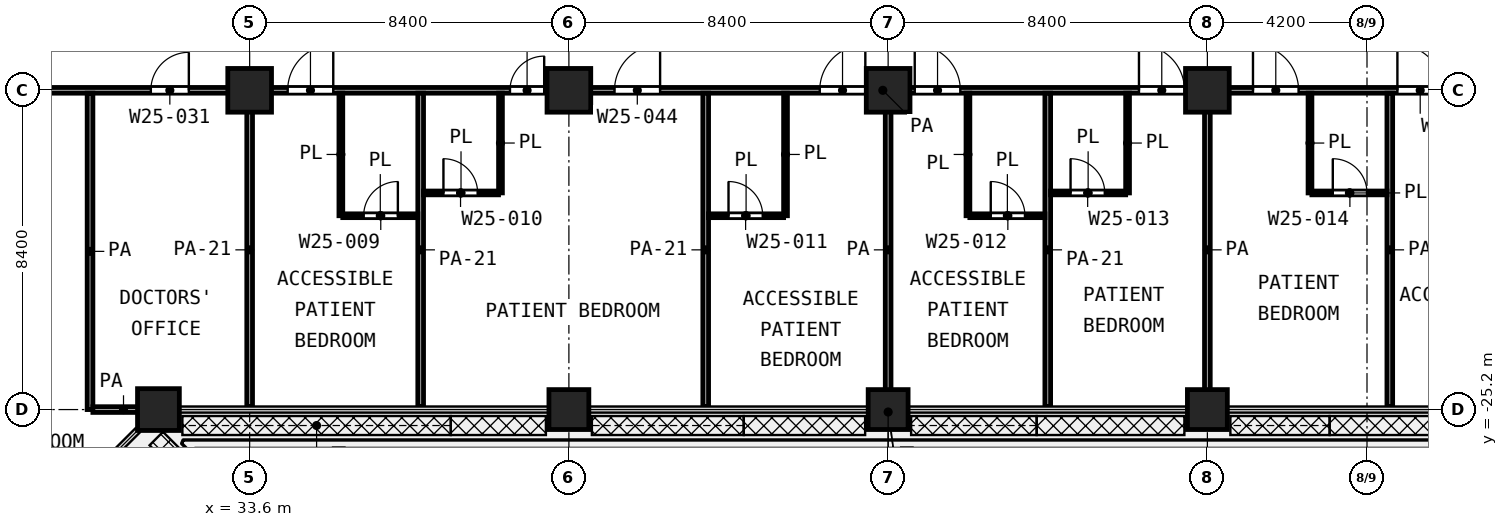
"""IFC4 building model, lengths in metres.
Left out: names, types, materials, properties, quantities, classifications, styles, units other than length and angle.
Written with IfcOpenShell. Run it as: python <this file> out.ifc"""

import sys

from ifc_helpers import new_model, si_unit, direction, frame, frame_2d, origin, origin_2d, place, context, subcontext, project, spatial, rectangle, extrude, element, fill, save


model = new_model("IFC4")
c1 = context("Model", 3, precision=1e-05, world=origin(), true_north=direction((0.0, 1.0)))
c2 = subcontext(c1, "Body", "Model", "MODEL_VIEW")
j1 = project(units=[si_unit("LENGTHUNIT", "METRE"), si_unit("PLANEANGLEUNIT", "RADIAN")], contexts=[c1])
p1 = place(None, origin())
s1 = spatial("IfcSite", under=j1, at=p1, CompositionType="ELEMENT")
p2 = place(p1, origin())
s2 = spatial("IfcBuilding", under=s1, at=p2, CompositionType="ELEMENT")
p3 = place(p2, frame((0.0, 0.0, 132.4)))
s3 = spatial("IfcBuildingStorey", under=s2, at=p3, CompositionType="ELEMENT", Elevation=132.4)
for number, where, z_axis, x_axis in (
    (1, (33.6, -16.8, 0.0), (0.0, 0.0, 1.0), (1.0, 0.0, 0.0)),
    (2, (42.0, -16.8, 0.0), (0.0, 0.0, 1.0), (1.0, 0.0, 0.0)),
    (3, (50.4, -16.8, 0.0), (0.0, 0.0, 1.0), (1.0, 0.0, 0.0)),
    (4, (58.8, -16.8, 0.0), (0.0, 0.0, 1.0), (1.0, 0.0, 0.0)),
):
    element("IfcColumn", number, at=place(p3, frame(where, z_axis=z_axis, x_axis=x_axis)), inside=s3, PredefinedType="COLUMN", context=c2, shape_type="SweptSolid", body=[
        extrude(rectangle(XDim=1.15, YDim=1.15, at=origin_2d()), origin(), (0.0, 0.0, 1.0), 4.2),
    ])
p4 = place(p3, frame((31.2, -25.2, 0.0), z_axis=(0.0, 0.0, 1.0), x_axis=(1.0, 0.0, 0.0)))
e5 = element("IfcColumn", 5, at=p4, inside=s3, PredefinedType="COLUMN", context=c2, shape_type="SweptSolid", body=[
    extrude(rectangle(XDim=1.1, YDim=1.1, at=origin_2d()), origin(), (0.0, 0.0, 1.0), 4.2),
])
for number, where, z_axis, x_axis in (
    (6, (42.0, -25.2, 0.0), (0.0, 0.0, 1.0), (1.0, 0.0, 0.0)),
    (7, (50.4, -25.2, 0.0), (0.0, 0.0, 1.0), (1.0, 0.0, 0.0)),
    (8, (58.8, -25.2, 0.0), (0.0, 0.0, 1.0), (1.0, 0.0, 0.0)),
):
    element("IfcColumn", number, at=place(p3, frame(where, z_axis=z_axis, x_axis=x_axis)), inside=s3, PredefinedType="COLUMN", context=c2, shape_type="SweptSolid", body=[
        extrude(rectangle(XDim=1.05, YDim=1.05, at=origin_2d()), origin(), (0.0, 0.0, 1.0), 4.2),
    ])
p5 = place(p3, frame((36.05, -20.1, 0.0), z_axis=(0.0, 0.0, 1.0), x_axis=(1.0, 0.0, 0.0)))
e9 = element("IfcWall", 9, at=p5, inside=s3, PredefinedType="PARTITIONING", context=c2, shape_type="SweptSolid", body=[
    extrude(rectangle(XDim=1.975, YDim=0.1, at=frame_2d((0.987, 0.0))), origin(), (0.0, 0.0, 1.0), 3.6),
])
p6 = place(p5, frame((0.55, 0.0, 0.0)))
e10 = element("IfcOpeningElement", 10, at=p6, cuts=e9, PredefinedType="OPENING", context=c2, shape_type="SweptSolid", body=[
    extrude(rectangle(XDim=0.9, YDim=2.1, at=frame_2d((0.45, 1.05))), frame((0.0, 0.06, 0.0), z_axis=(0.0, -1.0, 0.0), x_axis=(1.0, 0.0, 0.0)), (0.0, 0.0, 1.0), 0.12),
])
p7 = place(p3, frame((45.675, -20.1, 0.0), z_axis=(0.0, 0.0, 1.0), x_axis=(1.0, 0.0, 0.0)))
e11 = element("IfcWall", 11, at=p7, inside=s3, PredefinedType="PARTITIONING", context=c2, shape_type="SweptSolid", body=[
    extrude(rectangle(XDim=1.975, YDim=0.1, at=frame_2d((0.987, 0.0))), origin(), (0.0, 0.0, 1.0), 3.6),
])
p8 = place(p7, frame((0.525, 0.0, 0.0)))
e12 = element("IfcOpeningElement", 12, at=p8, cuts=e11, PredefinedType="OPENING", context=c2, shape_type="SweptSolid", body=[
    extrude(rectangle(XDim=0.9, YDim=2.1, at=frame_2d((0.45, 1.05))), frame((0.0, 0.06, 0.0), z_axis=(0.0, -1.0, 0.0), x_axis=(1.0, 0.0, 0.0)), (0.0, 0.0, 1.0), 0.12),
])
p9 = place(p3, frame((52.55, -20.1, 0.0), z_axis=(0.0, 0.0, 1.0), x_axis=(1.0, 0.0, 0.0)))
e13 = element("IfcWall", 13, at=p9, inside=s3, PredefinedType="PARTITIONING", context=c2, shape_type="SweptSolid", body=[
    extrude(rectangle(XDim=1.975, YDim=0.1, at=frame_2d((0.987, 0.0))), origin(), (0.0, 0.0, 1.0), 3.6),
])
p10 = place(p9, frame((0.55, 0.0, 0.0)))
e14 = element("IfcOpeningElement", 14, at=p10, cuts=e13, PredefinedType="OPENING", context=c2, shape_type="SweptSolid", body=[
    extrude(rectangle(XDim=0.9, YDim=2.1, at=frame_2d((0.45, 1.05))), frame((0.0, 0.06, 0.0), z_axis=(0.0, -1.0, 0.0), x_axis=(1.0, 0.0, 0.0)), (0.0, 0.0, 1.0), 0.12),
])
p11 = place(p3, frame((38.175, -19.5, 0.0), z_axis=(0.0, 0.0, 1.0), x_axis=(1.0, 0.0, 0.0)))
e15 = element("IfcWall", 15, at=p11, inside=s3, PredefinedType="PARTITIONING", context=c2, shape_type="SweptSolid", body=[
    extrude(rectangle(XDim=1.973, YDim=0.1, at=frame_2d((0.986, 0.0))), origin(), (0.0, 0.0, 1.0), 3.6),
])
p12 = place(p11, frame((0.524, 0.0, 0.0)))
e16 = element("IfcOpeningElement", 16, at=p12, cuts=e15, PredefinedType="OPENING", context=c2, shape_type="SweptSolid", body=[
    extrude(rectangle(XDim=0.9, YDim=2.1, at=frame_2d((0.45, 1.05))), frame((0.0, 0.06, 0.0), z_axis=(0.0, -1.0, 0.0), x_axis=(1.0, 0.0, 0.0)), (0.0, 0.0, 1.0), 0.12),
])
p13 = place(p3, frame((54.675, -19.5, 0.0), z_axis=(0.0, 0.0, 1.0), x_axis=(1.0, 0.0, 0.0)))
e17 = element("IfcWall", 17, at=p13, inside=s3, PredefinedType="PARTITIONING", context=c2, shape_type="SweptSolid", body=[
    extrude(rectangle(XDim=1.975, YDim=0.1, at=frame_2d((0.987, 0.0))), origin(), (0.0, 0.0, 1.0), 3.6),
])
p14 = place(p13, frame((0.525, 0.0, 0.0)))
e18 = element("IfcOpeningElement", 18, at=p14, cuts=e17, PredefinedType="OPENING", context=c2, shape_type="SweptSolid", body=[
    extrude(rectangle(XDim=0.9, YDim=2.1, at=frame_2d((0.45, 1.05))), frame((0.0, 0.06, 0.0), z_axis=(0.0, -1.0, 0.0), x_axis=(1.0, 0.0, 0.0)), (0.0, 0.0, 1.0), 0.12),
])
p15 = place(p3, frame((61.55, -19.5, 0.0), z_axis=(0.0, 0.0, 1.0), x_axis=(1.0, 0.0, 0.0)))
e19 = element("IfcWall", 19, at=p15, inside=s3, PredefinedType="PARTITIONING", context=c2, shape_type="SweptSolid", body=[
    extrude(rectangle(XDim=1.975, YDim=0.1, at=frame_2d((0.987, 0.0))), origin(), (0.0, 0.0, 1.0), 3.6),
])
p16 = place(p15, frame((0.55, 0.0, 0.0)))
e20 = element("IfcOpeningElement", 20, at=p16, cuts=e19, PredefinedType="OPENING", context=c2, shape_type="SweptSolid", body=[
    extrude(rectangle(XDim=0.9, YDim=2.1, at=frame_2d((0.45, 1.05))), frame((0.0, 0.06, 0.0), z_axis=(0.0, -1.0, 0.0), x_axis=(1.0, 0.0, 0.0)), (0.0, 0.0, 1.0), 0.12),
])
p17 = place(p3, frame((36.0, -20.1, 0.0), z_axis=(0.0, 0.0, 1.0), x_axis=(0.0, 1.0, 0.0)))
e21 = element("IfcWall", 21, at=p17, inside=s3, PredefinedType="PARTITIONING", context=c2, shape_type="SweptSolid", body=[
    extrude(rectangle(XDim=3.225, YDim=0.1, at=frame_2d((1.613, 0.0))), origin(), (0.0, 0.0, 1.0), 3.6),
])
p18 = place(p3, frame((40.2, -19.499, 0.0), z_axis=(0.0, 0.0, 1.0), x_axis=(0.0, 1.0, 0.0)))
e22 = element("IfcWall", 22, at=p18, inside=s3, PredefinedType="PARTITIONING", context=c2, shape_type="SweptSolid", body=[
    extrude(rectangle(XDim=2.624, YDim=0.1, at=frame_2d((1.312, 0.0))), origin(), (0.0, 0.0, 1.0), 3.6),
])
for number, where, z_axis, x_axis in (
    (23, (47.7, -20.1, 0.0), (0.0, 0.0, 1.0), (0.0, 1.0, 0.0)),
    (24, (52.5, -20.1, 0.0), (0.0, 0.0, 1.0), (0.0, 1.0, 0.0)),
):
    element("IfcWall", number, at=place(p3, frame(where, z_axis=z_axis, x_axis=x_axis)), inside=s3, PredefinedType="PARTITIONING", context=c2, shape_type="SweptSolid", body=[
        extrude(rectangle(XDim=3.225, YDim=0.1, at=frame_2d((1.613, 0.0))), origin(), (0.0, 0.0, 1.0), 3.6),
    ])
for number, where, z_axis, x_axis in (
    (25, (56.7, -19.5, 0.0), (0.0, 0.0, 1.0), (0.0, 1.0, 0.0)),
    (26, (61.5, -19.5, 0.0), (0.0, 0.0, 1.0), (0.0, 1.0, 0.0)),
):
    element("IfcWall", number, at=place(p3, frame(where, z_axis=z_axis, x_axis=x_axis)), inside=s3, PredefinedType="PARTITIONING", context=c2, shape_type="SweptSolid", body=[
        extrude(rectangle(XDim=2.625, YDim=0.1, at=frame_2d((1.312, 0.0))), origin(), (0.0, 0.0, 1.0), 3.6),
    ])
p19 = place(p3, frame((29.475, -25.2, 0.0), z_axis=(0.0, 0.0, 1.0), x_axis=(1.0, 0.0, 0.0)))
e27 = element("IfcWall", 27, at=p19, inside=s3, PredefinedType="PARTITIONING", context=c2, shape_type="SweptSolid", body=[
    extrude(rectangle(XDim=1.612, YDim=0.15, at=frame_2d((0.806, 0.0))), origin(), (0.0, 0.0, 1.0), 3.6),
])
p20 = place(p3, frame((25.0, -16.8, 0.0), z_axis=(0.0, 0.0, 1.0), x_axis=(1.0, 0.0, 0.0)))
e28 = element("IfcWall", 28, at=p20, inside=s3, PredefinedType="PARTITIONING", context=c2, shape_type="SweptSolid", body=[
    extrude(rectangle(XDim=50.52, YDim=0.15, at=frame_2d((25.26, 0.0))), origin(), (0.0, 0.0, 1.0), 3.6),
])
p21 = place(p20, frame((1.55, 0.0, 0.0)))
e29 = element("IfcOpeningElement", 29, at=p21, cuts=e28, PredefinedType="OPENING", context=c2, shape_type="SweptSolid", body=[
    extrude(rectangle(XDim=1.5, YDim=2.1, at=frame_2d((0.75, 1.05))), frame((0.0, 0.085, 0.0), z_axis=(0.0, -1.0, 0.0), x_axis=(1.0, 0.0, 0.0)), (0.0, 0.0, 1.0), 0.17),
])
p22 = place(p20, frame((6.0, 0.0, 0.0)))
e30 = element("IfcOpeningElement", 30, at=p22, cuts=e28, PredefinedType="OPENING", context=c2, shape_type="SweptSolid", body=[
    extrude(rectangle(XDim=1.0, YDim=2.1, at=frame_2d((0.5, 1.05))), frame((0.0, 0.085, 0.0), z_axis=(0.0, -1.0, 0.0), x_axis=(1.0, 0.0, 0.0)), (0.0, 0.0, 1.0), 0.17),
])
p23 = place(p20, frame((9.6, 0.0, 0.0)))
e31 = element("IfcOpeningElement", 31, at=p23, cuts=e28, PredefinedType="OPENING", context=c2, shape_type="SweptSolid", body=[
    extrude(rectangle(XDim=1.2, YDim=2.1, at=frame_2d((0.6, 1.05))), frame((0.0, 0.085, 0.0), z_axis=(0.0, -1.0, 0.0), x_axis=(1.0, 0.0, 0.0)), (0.0, 0.0, 1.0), 0.17),
])
p24 = place(p20, frame((18.2, 0.0, 0.0)))
e32 = element("IfcOpeningElement", 32, at=p24, cuts=e28, PredefinedType="OPENING", context=c2, shape_type="SweptSolid", body=[
    extrude(rectangle(XDim=1.2, YDim=2.1, at=frame_2d((0.6, 1.05))), frame((0.0, 0.085, 0.0), z_axis=(0.0, -1.0, 0.0), x_axis=(1.0, 0.0, 0.0)), (0.0, 0.0, 1.0), 0.17),
])
p25 = place(p20, frame((15.45, 0.0, 0.0)))
e33 = element("IfcOpeningElement", 33, at=p25, cuts=e28, PredefinedType="OPENING", context=c2, shape_type="SweptSolid", body=[
    extrude(rectangle(XDim=0.9, YDim=2.1, at=frame_2d((0.45, 1.05))), frame((0.0, 0.085, 0.0), z_axis=(0.0, -1.0, 0.0), x_axis=(1.0, 0.0, 0.0)), (0.0, 0.0, 1.0), 0.17),
])
p26 = place(p20, frame((23.6, 0.0, 0.0)))
e34 = element("IfcOpeningElement", 34, at=p26, cuts=e28, PredefinedType="OPENING", context=c2, shape_type="SweptSolid", body=[
    extrude(rectangle(XDim=1.2, YDim=2.1, at=frame_2d((0.6, 1.05))), frame((0.0, 0.085, 0.0), z_axis=(0.0, -1.0, 0.0), x_axis=(1.0, 0.0, 0.0)), (0.0, 0.0, 1.0), 0.17),
])
p27 = place(p20, frame((26.1, 0.0, 0.0)))
e35 = element("IfcOpeningElement", 35, at=p27, cuts=e28, PredefinedType="OPENING", context=c2, shape_type="SweptSolid", body=[
    extrude(rectangle(XDim=1.2, YDim=2.1, at=frame_2d((0.6, 1.05))), frame((0.0, 0.085, 0.0), z_axis=(0.0, -1.0, 0.0), x_axis=(1.0, 0.0, 0.0)), (0.0, 0.0, 1.0), 0.17),
])
p28 = place(p20, frame((32.0, 0.0, 0.0)))
e36 = element("IfcOpeningElement", 36, at=p28, cuts=e28, PredefinedType="OPENING", context=c2, shape_type="SweptSolid", body=[
    extrude(rectangle(XDim=1.2, YDim=2.1, at=frame_2d((0.6, 1.05))), frame((0.0, 0.085, 0.0), z_axis=(0.0, -1.0, 0.0), x_axis=(1.0, 0.0, 0.0)), (0.0, 0.0, 1.0), 0.17),
])
p29 = place(p20, frame((35.0, 0.0, 0.0)))
e37 = element("IfcOpeningElement", 37, at=p29, cuts=e28, PredefinedType="OPENING", context=c2, shape_type="SweptSolid", body=[
    extrude(rectangle(XDim=1.2, YDim=2.1, at=frame_2d((0.6, 1.05))), frame((0.0, 0.085, 0.0), z_axis=(0.0, -1.0, 0.0), x_axis=(1.0, 0.0, 0.0)), (0.0, 0.0, 1.0), 0.17),
])
p30 = place(p20, frame((40.4, 0.0, 0.0)))
e38 = element("IfcOpeningElement", 38, at=p30, cuts=e28, PredefinedType="OPENING", context=c2, shape_type="SweptSolid", body=[
    extrude(rectangle(XDim=1.2, YDim=2.1, at=frame_2d((0.6, 1.05))), frame((0.0, 0.085, 0.0), z_axis=(0.0, -1.0, 0.0), x_axis=(1.0, 0.0, 0.0)), (0.0, 0.0, 1.0), 0.17),
])
p31 = place(p20, frame((38.8, 0.0, 0.0)))
e39 = element("IfcOpeningElement", 39, at=p31, cuts=e28, PredefinedType="OPENING", context=c2, shape_type="SweptSolid", body=[
    extrude(rectangle(XDim=1.2, YDim=2.1, at=frame_2d((0.6, 1.05))), frame((0.0, 0.085, 0.0), z_axis=(0.0, -1.0, 0.0), x_axis=(1.0, 0.0, 0.0)), (0.0, 0.0, 1.0), 0.17),
])
p32 = place(p20, frame((47.85, 0.0, 0.0)))
e40 = element("IfcOpeningElement", 40, at=p32, cuts=e28, PredefinedType="OPENING", context=c2, shape_type="SweptSolid", body=[
    extrude(rectangle(XDim=1.0, YDim=2.1, at=frame_2d((0.5, 1.05))), frame((0.0, 0.085, 0.0), z_axis=(0.0, -1.0, 0.0), x_axis=(1.0, 0.0, 0.0)), (0.0, 0.0, 1.0), 0.17),
])
p33 = place(p3, frame((29.4, -25.2, 0.0), z_axis=(0.0, 0.0, 1.0), x_axis=(0.0, 1.0, 0.0)))
e41 = element("IfcWall", 41, at=p33, inside=s3, PredefinedType="PARTITIONING", context=c2, shape_type="SweptSolid", body=[
    extrude(rectangle(XDim=8.325, YDim=0.15, at=frame_2d((4.163, 0.0))), origin(), (0.0, 0.0, 1.0), 3.6),
])
for number, where, z_axis, x_axis in (
    (42, (33.6, -25.12, 0.0), (0.0, 0.0, 1.0), (0.0, 1.0, 0.0)),
    (43, (38.1, -25.12, 0.0), (0.0, 0.0, 1.0), (0.0, 1.0, 0.0)),
    (44, (45.6, -25.12, 0.0), (0.0, 0.0, 1.0), (0.0, 1.0, 0.0)),
):
    element("IfcWall", number, at=place(p3, frame(where, z_axis=z_axis, x_axis=x_axis)), inside=s3, PredefinedType="PARTITIONING", context=c2, shape_type="SweptSolid", body=[
        extrude(rectangle(XDim=8.245, YDim=0.15, at=frame_2d((4.123, 0.0))), origin(), (0.0, 0.0, 1.0), 2.7),
    ])
p34 = place(p3, frame((50.4, -25.12, 0.0), z_axis=(0.0, 0.0, 1.0), x_axis=(0.0, 1.0, 0.0)))
e45 = element("IfcWall", 45, at=p34, inside=s3, PredefinedType="PARTITIONING", context=c2, shape_type="SweptSolid", body=[
    extrude(rectangle(XDim=8.245, YDim=0.15, at=frame_2d((4.123, 0.0))), origin(), (0.0, 0.0, 1.0), 3.6),
])
p35 = place(p3, frame((54.6, -25.12, 0.0), z_axis=(0.0, 0.0, 1.0), x_axis=(0.0, 1.0, 0.0)))
e46 = element("IfcWall", 46, at=p35, inside=s3, PredefinedType="PARTITIONING", context=c2, shape_type="SweptSolid", body=[
    extrude(rectangle(XDim=8.245, YDim=0.15, at=frame_2d((4.123, 0.0))), origin(), (0.0, 0.0, 1.0), 2.7),
])
p36 = place(p3, frame((58.8, -25.12, 0.0), z_axis=(0.0, 0.0, 1.0), x_axis=(0.0, 1.0, 0.0)))
e47 = element("IfcWall", 47, at=p36, inside=s3, PredefinedType="PARTITIONING", context=c2, shape_type="SweptSolid", body=[
    extrude(rectangle(XDim=8.245, YDim=0.15, at=frame_2d((4.123, 0.0))), origin(), (0.0, 0.0, 1.0), 3.6),
])
p37 = place(p3, frame((63.6, -25.12, 0.0), z_axis=(0.0, 0.0, 1.0), x_axis=(0.0, 1.0, 0.0)))
e48 = element("IfcWall", 48, at=p37, inside=s3, PredefinedType="PARTITIONING", context=c2, shape_type="SweptSolid", body=[
    extrude(rectangle(XDim=8.245, YDim=0.15, at=frame_2d((4.123, 0.0))), origin(), (0.0, 0.0, 1.0), 2.7),
])
p38 = place(p22, origin())
e49 = element("IfcDoor", 49, at=p38, inside=s3, OperationType="SINGLE_SWING_RIGHT", PredefinedType="DOOR", context=c2, shape_type="SweptSolid", body=[
    extrude(rectangle(XDim=1.0, YDim=2.1, at=frame_2d((0.5, 1.05))), frame((0.0, 0.025, 0.0), z_axis=(0.0, -1.0, 0.0), x_axis=(1.0, 0.0, 0.0)), (0.0, 0.0, 1.0), 0.05),
])
fill(e30, e49)
p39 = place(p23, origin())
e50 = element("IfcDoor", 50, at=p39, inside=s3, OperationType="SINGLE_SWING_RIGHT", PredefinedType="DOOR", context=c2, shape_type="SweptSolid", body=[
    extrude(rectangle(XDim=1.2, YDim=2.1, at=frame_2d((0.6, 1.05))), frame((0.0, 0.025, 0.0), z_axis=(0.0, -1.0, 0.0), x_axis=(1.0, 0.0, 0.0)), (0.0, 0.0, 1.0), 0.05),
])
fill(e31, e50)
p40 = place(p6, origin())
e51 = element("IfcDoor", 51, at=p40, inside=s3, OperationType="SINGLE_SWING_RIGHT", PredefinedType="DOOR", context=c2, shape_type="SweptSolid", body=[
    extrude(rectangle(XDim=0.9, YDim=2.1, at=frame_2d((0.45, 1.05))), frame((0.0, 0.025, 0.0), z_axis=(0.0, -1.0, 0.0), x_axis=(1.0, 0.0, 0.0)), (0.0, 0.0, 1.0), 0.05),
])
fill(e10, e51)
p41 = place(p24, origin())
e52 = element("IfcDoor", 52, at=p41, inside=s3, OperationType="SINGLE_SWING_RIGHT", PredefinedType="DOOR", context=c2, shape_type="SweptSolid", body=[
    extrude(rectangle(XDim=1.2, YDim=2.1, at=frame_2d((0.6, 1.05))), frame((0.0, 0.025, 0.0), z_axis=(0.0, -1.0, 0.0), x_axis=(1.0, 0.0, 0.0)), (0.0, 0.0, 1.0), 0.05),
])
fill(e32, e52)
p42 = place(p25, origin())
e53 = element("IfcDoor", 53, at=p42, inside=s3, OperationType="SINGLE_SWING_RIGHT", PredefinedType="DOOR", context=c2, shape_type="SweptSolid", body=[
    extrude(rectangle(XDim=0.9, YDim=2.1, at=frame_2d((0.45, 1.05))), frame((0.0, 0.025, 0.0), z_axis=(0.0, -1.0, 0.0), x_axis=(1.0, 0.0, 0.0)), (0.0, 0.0, 1.0), 0.05),
])
fill(e33, e53)
p43 = place(p12, origin())
e54 = element("IfcDoor", 54, at=p43, inside=s3, OperationType="SINGLE_SWING_LEFT", PredefinedType="DOOR", context=c2, shape_type="SweptSolid", body=[
    extrude(rectangle(XDim=0.9, YDim=2.1, at=frame_2d((0.45, 1.05))), frame((0.0, 0.025, 0.0), z_axis=(0.0, -1.0, 0.0), x_axis=(1.0, 0.0, 0.0)), (0.0, 0.0, 1.0), 0.05),
])
fill(e16, e54)
p44 = place(p26, origin())
e55 = element("IfcDoor", 55, at=p44, inside=s3, OperationType="SINGLE_SWING_RIGHT", PredefinedType="DOOR", context=c2, shape_type="SweptSolid", body=[
    extrude(rectangle(XDim=1.2, YDim=2.1, at=frame_2d((0.6, 1.05))), frame((0.0, 0.025, 0.0), z_axis=(0.0, -1.0, 0.0), x_axis=(1.0, 0.0, 0.0)), (0.0, 0.0, 1.0), 0.05),
])
fill(e34, e55)
p45 = place(p8, origin())
e56 = element("IfcDoor", 56, at=p45, inside=s3, OperationType="SINGLE_SWING_LEFT", PredefinedType="DOOR", context=c2, shape_type="SweptSolid", body=[
    extrude(rectangle(XDim=0.9, YDim=2.1, at=frame_2d((0.45, 1.05))), frame((0.0, 0.025, 0.0), z_axis=(0.0, -1.0, 0.0), x_axis=(1.0, 0.0, 0.0)), (0.0, 0.0, 1.0), 0.05),
])
fill(e12, e56)
p46 = place(p27, origin())
e57 = element("IfcDoor", 57, at=p46, inside=s3, OperationType="SINGLE_SWING_LEFT", PredefinedType="DOOR", context=c2, shape_type="SweptSolid", body=[
    extrude(rectangle(XDim=1.2, YDim=2.1, at=frame_2d((0.6, 1.05))), frame((0.0, 0.025, 0.0), z_axis=(0.0, -1.0, 0.0), x_axis=(1.0, 0.0, 0.0)), (0.0, 0.0, 1.0), 0.05),
])
fill(e35, e57)
p47 = place(p10, origin())
e58 = element("IfcDoor", 58, at=p47, inside=s3, OperationType="SINGLE_SWING_LEFT", PredefinedType="DOOR", context=c2, shape_type="SweptSolid", body=[
    extrude(rectangle(XDim=0.9, YDim=2.1, at=frame_2d((0.45, 1.05))), frame((0.0, 0.025, 0.0), z_axis=(0.0, -1.0, 0.0), x_axis=(1.0, 0.0, 0.0)), (0.0, 0.0, 1.0), 0.05),
])
fill(e14, e58)
p48 = place(p28, origin())
e59 = element("IfcDoor", 59, at=p48, inside=s3, OperationType="SINGLE_SWING_LEFT", PredefinedType="DOOR", context=c2, shape_type="SweptSolid", body=[
    extrude(rectangle(XDim=1.2, YDim=2.1, at=frame_2d((0.6, 1.05))), frame((0.0, 0.025, 0.0), z_axis=(0.0, -1.0, 0.0), x_axis=(1.0, 0.0, 0.0)), (0.0, 0.0, 1.0), 0.05),
])
fill(e36, e59)
p49 = place(p14, origin())
e60 = element("IfcDoor", 60, at=p49, inside=s3, OperationType="SINGLE_SWING_LEFT", PredefinedType="DOOR", context=c2, shape_type="SweptSolid", body=[
    extrude(rectangle(XDim=0.9, YDim=2.1, at=frame_2d((0.45, 1.05))), frame((0.0, 0.025, 0.0), z_axis=(0.0, -1.0, 0.0), x_axis=(1.0, 0.0, 0.0)), (0.0, 0.0, 1.0), 0.05),
])
fill(e18, e60)
p50 = place(p29, origin())
e61 = element("IfcDoor", 61, at=p50, inside=s3, OperationType="SINGLE_SWING_LEFT", PredefinedType="DOOR", context=c2, shape_type="SweptSolid", body=[
    extrude(rectangle(XDim=1.2, YDim=2.1, at=frame_2d((0.6, 1.05))), frame((0.0, 0.025, 0.0), z_axis=(0.0, -1.0, 0.0), x_axis=(1.0, 0.0, 0.0)), (0.0, 0.0, 1.0), 0.05),
])
fill(e37, e61)
p51 = place(p16, origin())
e62 = element("IfcDoor", 62, at=p51, inside=s3, OperationType="SINGLE_SWING_LEFT", PredefinedType="DOOR", context=c2, shape_type="SweptSolid", body=[
    extrude(rectangle(XDim=0.9, YDim=2.1, at=frame_2d((0.45, 1.05))), frame((0.0, 0.025, 0.0), z_axis=(0.0, -1.0, 0.0), x_axis=(1.0, 0.0, 0.0)), (0.0, 0.0, 1.0), 0.05),
])
fill(e20, e62)
p52 = place(p31, origin())
e63 = element("IfcDoor", 63, at=p52, inside=s3, OperationType="SINGLE_SWING_LEFT", PredefinedType="DOOR", context=c2, shape_type="SweptSolid", body=[
    extrude(rectangle(XDim=1.2, YDim=2.1, at=frame_2d((0.6, 1.05))), frame((0.0, 0.025, 0.0), z_axis=(0.0, -1.0, 0.0), x_axis=(1.0, 0.0, 0.0)), (0.0, 0.0, 1.0), 0.05),
])
fill(e39, e63)
save(model, sys.argv[1])
